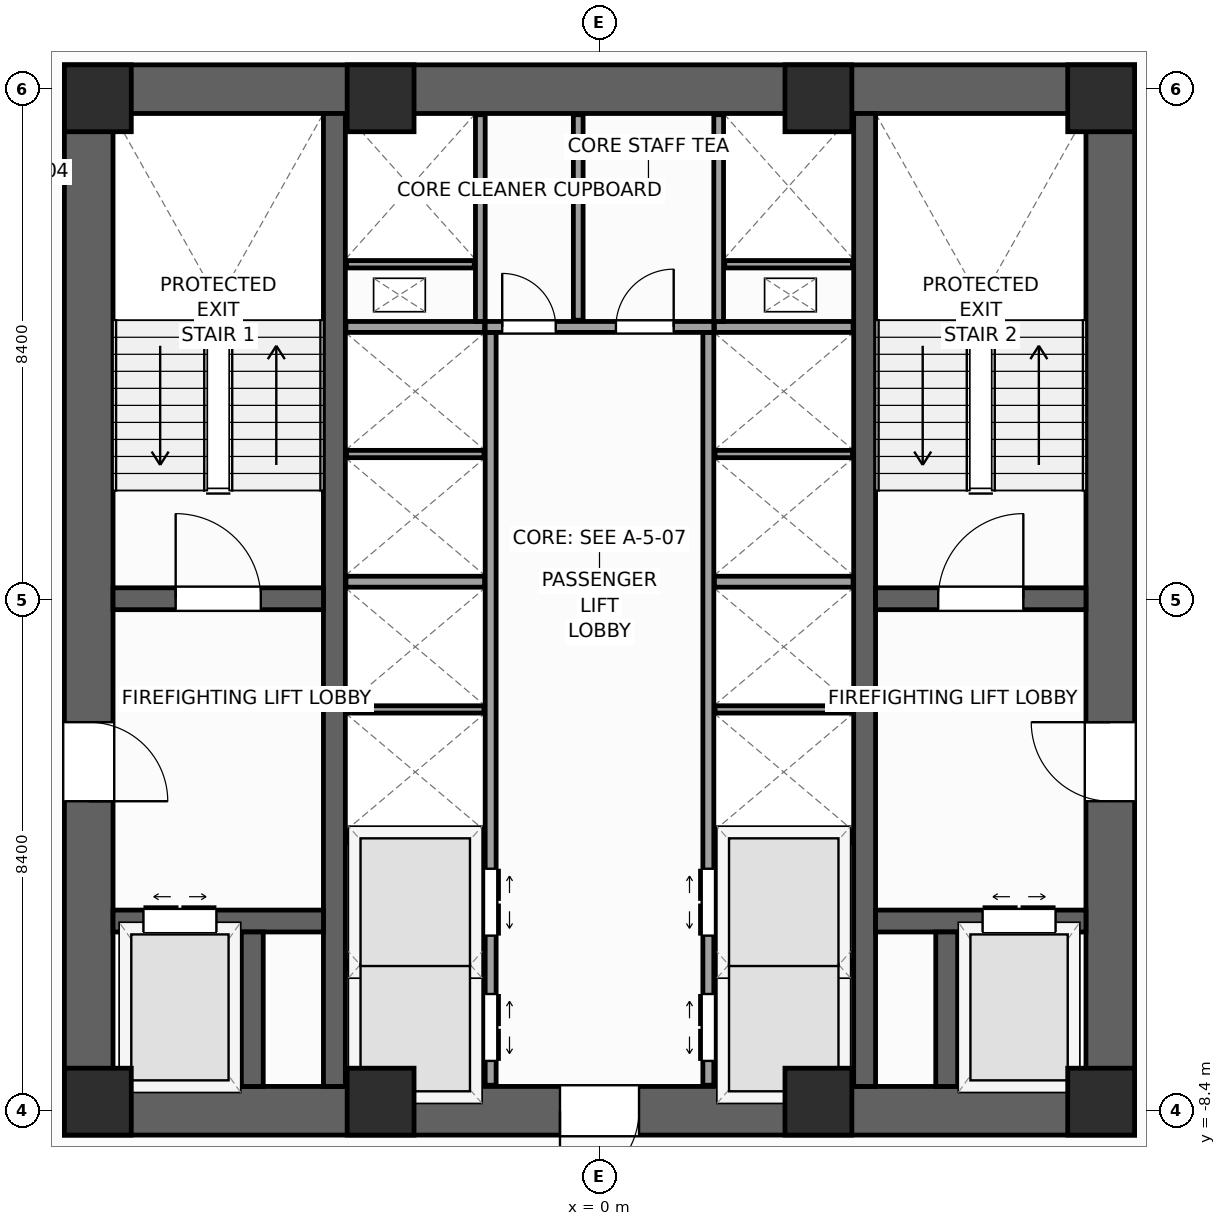
"""IFC4 building model, lengths in metres.
Left out: names, types, materials, properties, quantities, classifications, styles, units other than length and angle.
Written with IfcOpenShell. Run it as: python <this file> out.ifc"""

import sys

from ifc_helpers import new_model, si_unit, direction, frame, frame_2d, origin, origin_2d, place, context, subcontext, project, spatial, rectangle, extrude, source, transform, mapped, element, fill, save


model = new_model("IFC4")
c1 = context("Model", 3, precision=1e-05, world=origin(), true_north=direction((0.0, 1.0)))
c2 = subcontext(c1, "Body", "Model", "MODEL_VIEW")
j1 = project(units=[si_unit("LENGTHUNIT", "METRE"), si_unit("PLANEANGLEUNIT", "RADIAN")], contexts=[c1])
p1 = place(None, origin())
s1 = spatial("IfcSite", under=j1, at=p1, CompositionType="ELEMENT")
p2 = place(p1, origin())
s2 = spatial("IfcBuilding", under=s1, at=p2, CompositionType="ELEMENT")
p3 = place(p2, frame((0.0, 0.0, 38.0)))
s3 = spatial("IfcBuildingStorey", under=s2, at=p3, CompositionType="ELEMENT", Elevation=38.0)
p4 = place(p3, frame((-8.8, -8.4, 0.0), z_axis=(0.0, 0.0, 1.0), x_axis=(1.0, 0.0, 0.0)))
e1 = element("IfcWall", 1, at=p4, inside=s3, PredefinedType="SHEAR", context=c2, shape_type="SweptSolid", body=[
    extrude(rectangle(XDim=17.6, YDim=0.8, at=frame_2d((8.8, 0.0))), origin(), (0.0, 0.0, 1.0), 4.0),
])
p5 = place(p4, frame((8.15, 0.0, 0.0)))
e2 = element("IfcOpeningElement", 2, at=p5, cuts=e1, PredefinedType="OPENING", context=c2, shape_type="SweptSolid", body=[
    extrude(rectangle(XDim=1.3, YDim=2.2, at=frame_2d((0.65, 1.1))), frame((0.0, 0.41, 0.0), z_axis=(0.0, -1.0, 0.0), x_axis=(1.0, 0.0, 0.0)), (0.0, 0.0, 1.0), 0.82),
])
p6 = place(p3, frame((-8.8, 8.4, 0.0), z_axis=(0.0, 0.0, 1.0), x_axis=(1.0, 0.0, 0.0)))
e3 = element("IfcWall", 3, at=p6, inside=s3, PredefinedType="SHEAR", context=c2, shape_type="SweptSolid", body=[
    extrude(rectangle(XDim=17.6, YDim=0.8, at=frame_2d((8.8, 0.0))), origin(), (0.0, 0.0, 1.0), 4.0),
])
p7 = place(p3, frame((-8.4, -8.0, 0.0), z_axis=(0.0, 0.0, 1.0), x_axis=(0.0, 1.0, 0.0)))
e4 = element("IfcWall", 4, at=p7, inside=s3, PredefinedType="SHEAR", context=c2, shape_type="SweptSolid", body=[
    extrude(rectangle(XDim=16.0, YDim=0.8, at=frame_2d((8.0, 0.0))), origin(), (0.0, 0.0, 1.0), 4.0),
])
p8 = place(p7, frame((4.69, 0.0, 0.0)))
e5 = element("IfcOpeningElement", 5, at=p8, cuts=e4, PredefinedType="OPENING", context=c2, shape_type="SweptSolid", body=[
    extrude(rectangle(XDim=1.3, YDim=2.2, at=frame_2d((0.65, 1.1))), frame((0.0, 0.41, 0.0), z_axis=(0.0, -1.0, 0.0), x_axis=(1.0, 0.0, 0.0)), (0.0, 0.0, 1.0), 0.82),
])
p9 = place(p3, frame((8.4, -8.0, 0.0), z_axis=(0.0, 0.0, 1.0), x_axis=(0.0, 1.0, 0.0)))
e6 = element("IfcWall", 6, at=p9, inside=s3, PredefinedType="SHEAR", context=c2, shape_type="SweptSolid", body=[
    extrude(rectangle(XDim=16.0, YDim=0.8, at=frame_2d((8.0, 0.0))), origin(), (0.0, 0.0, 1.0), 4.0),
])
p10 = place(p9, frame((4.69, 0.0, 0.0)))
e7 = element("IfcOpeningElement", 7, at=p10, cuts=e6, PredefinedType="OPENING", context=c2, shape_type="SweptSolid", body=[
    extrude(rectangle(XDim=1.3, YDim=2.2, at=frame_2d((0.65, 1.1))), frame((0.0, 0.41, 0.0), z_axis=(0.0, -1.0, 0.0), x_axis=(1.0, 0.0, 0.0)), (0.0, 0.0, 1.0), 0.82),
])
for number, where, z_axis, x_axis in (
    (8, (-4.36, -8.0, 0.0), (0.0, 0.0, 1.0), (0.0, 1.0, 0.0)),
    (9, (4.36, -8.0, 0.0), (0.0, 0.0, 1.0), (0.0, 1.0, 0.0)),
):
    element("IfcWall", number, at=place(p3, frame(where, z_axis=z_axis, x_axis=x_axis)), inside=s3, PredefinedType="SHEAR", context=c2, shape_type="SweptSolid", body=[
        extrude(rectangle(XDim=16.0, YDim=0.36, at=frame_2d((8.0, 0.0))), origin(), (0.0, 0.0, 1.0), 4.0),
    ])
p11 = place(p3, frame((-8.0, 0.02, 0.0), z_axis=(0.0, 0.0, 1.0), x_axis=(1.0, 0.0, 0.0)))
e10 = element("IfcWall", 10, at=p11, inside=s3, PredefinedType="SHEAR", context=c2, shape_type="SweptSolid", body=[
    extrude(rectangle(XDim=3.46, YDim=0.36, at=frame_2d((1.73, 0.0))), origin(), (0.0, 0.0, 1.0), 4.0),
])
p12 = place(p11, frame((1.03, 0.0, 0.0)))
e11 = element("IfcOpeningElement", 11, at=p12, cuts=e10, PredefinedType="OPENING", context=c2, shape_type="SweptSolid", body=[
    extrude(rectangle(XDim=1.4, YDim=2.2, at=frame_2d((0.7, 1.1))), frame((0.0, 0.19, 0.0), z_axis=(0.0, -1.0, 0.0), x_axis=(1.0, 0.0, 0.0)), (0.0, 0.0, 1.0), 0.38),
])
p13 = place(p3, frame((4.54, 0.02, 0.0), z_axis=(0.0, 0.0, 1.0), x_axis=(1.0, 0.0, 0.0)))
e12 = element("IfcWall", 12, at=p13, inside=s3, PredefinedType="SHEAR", context=c2, shape_type="SweptSolid", body=[
    extrude(rectangle(XDim=3.46, YDim=0.36, at=frame_2d((1.73, 0.0))), origin(), (0.0, 0.0, 1.0), 4.0),
])
p14 = place(p13, frame((1.03, 0.0, 0.0)))
e13 = element("IfcOpeningElement", 13, at=p14, cuts=e12, PredefinedType="OPENING", context=c2, shape_type="SweptSolid", body=[
    extrude(rectangle(XDim=1.4, YDim=2.2, at=frame_2d((0.7, 1.1))), frame((0.0, 0.19, 0.0), z_axis=(0.0, -1.0, 0.0), x_axis=(1.0, 0.0, 0.0)), (0.0, 0.0, 1.0), 0.38),
])
p15 = place(p3, frame((-8.0, -5.28, 0.0), z_axis=(0.0, 0.0, 1.0), x_axis=(1.0, 0.0, 0.0)))
e14 = element("IfcWall", 14, at=p15, inside=s3, PredefinedType="SHEAR", context=c2, shape_type="SweptSolid", body=[
    extrude(rectangle(XDim=3.46, YDim=0.36, at=frame_2d((1.73, 0.0))), origin(), (0.0, 0.0, 1.0), 4.0),
])
p16 = place(p15, frame((0.5, 0.0, 0.0)))
e15 = element("IfcOpeningElement", 15, at=p16, cuts=e14, PredefinedType="OPENING", context=c2, shape_type="SweptSolid", body=[
    extrude(rectangle(XDim=1.2, YDim=2.25, at=frame_2d((0.6, 1.125))), frame((0.0, 0.19, 0.0), z_axis=(0.0, -1.0, 0.0), x_axis=(1.0, 0.0, 0.0)), (0.0, 0.0, 1.0), 0.38),
])
p17 = place(p3, frame((4.54, -5.28, 0.0), z_axis=(0.0, 0.0, 1.0), x_axis=(1.0, 0.0, 0.0)))
e16 = element("IfcWall", 16, at=p17, inside=s3, PredefinedType="SHEAR", context=c2, shape_type="SweptSolid", body=[
    extrude(rectangle(XDim=3.46, YDim=0.36, at=frame_2d((1.73, 0.0))), origin(), (0.0, 0.0, 1.0), 4.0),
])
p18 = place(p17, frame((1.76, 0.0, 0.0)))
e17 = element("IfcOpeningElement", 17, at=p18, cuts=e16, PredefinedType="OPENING", context=c2, shape_type="SweptSolid", body=[
    extrude(rectangle(XDim=1.2, YDim=2.25, at=frame_2d((0.6, 1.125))), frame((0.0, 0.19, 0.0), z_axis=(0.0, -1.0, 0.0), x_axis=(1.0, 0.0, 0.0)), (0.0, 0.0, 1.0), 0.38),
])
for number, where, z_axis, x_axis in (
    (18, (-5.71, -8.0, 0.0), (0.0, 0.0, 1.0), (0.0, 1.0, 0.0)),
    (19, (5.71, -8.0, 0.0), (0.0, 0.0, 1.0), (0.0, 1.0, 0.0)),
):
    element("IfcWall", number, at=place(p3, frame(where, z_axis=z_axis, x_axis=x_axis)), inside=s3, PredefinedType="SHEAR", context=c2, shape_type="SweptSolid", body=[
        extrude(rectangle(XDim=2.54, YDim=0.36, at=frame_2d((1.27, 0.0))), origin(), (0.0, 0.0, 1.0), 4.0),
    ])
m1 = source(origin(), c2, "Body", "SweptSolid", [
    extrude(rectangle(XDim=1.1, YDim=1.1, at=origin_2d()), origin(), (0.0, 0.0, 1.0), 4.0),
])
for number, where, z_axis, x_axis in (
    (20, (-8.25, -8.25, 0.0), (0.0, 0.0, 1.0), (1.0, 0.0, 0.0)),
    (21, (8.25, -8.25, 0.0), (0.0, 0.0, 1.0), (1.0, 0.0, 0.0)),
    (22, (8.25, 8.25, 0.0), (0.0, 0.0, 1.0), (1.0, 0.0, 0.0)),
    (23, (-8.25, 8.25, 0.0), (0.0, 0.0, 1.0), (1.0, 0.0, 0.0)),
    (24, (-3.6, -8.25, 0.0), (0.0, 0.0, 1.0), (1.0, 0.0, 0.0)),
    (25, (3.6, -8.25, 0.0), (0.0, 0.0, 1.0), (1.0, 0.0, 0.0)),
    (26, (-3.6, 8.25, 0.0), (0.0, 0.0, 1.0), (1.0, 0.0, 0.0)),
    (27, (3.6, 8.25, 0.0), (0.0, 0.0, 1.0), (1.0, 0.0, 0.0)),
):
    element("IfcColumn", number, at=place(p3, frame(where, z_axis=z_axis, x_axis=x_axis)), inside=s3, PredefinedType="PILASTER", context=c2, shape_type="MappedRepresentation", body=[
        mapped(m1, transform((0.0, 0.0, 0.0), scale=1.0)),
    ])
p19 = place(p3, frame((-1.79, -7.98, 0.0), z_axis=(0.0, 0.0, 1.0), x_axis=(0.0, 1.0, 0.0)))
e28 = element("IfcWall", 28, at=p19, inside=s3, PredefinedType="PARTITIONING", context=c2, shape_type="SweptSolid", body=[
    extrude(rectangle(XDim=12.38, YDim=0.18, at=frame_2d((6.19, 0.0))), origin(), (0.0, 0.0, 1.0), 3.72),
])
p20 = place(p19, frame((0.4, 0.0, 0.0)))
e29 = element("IfcOpeningElement", 29, at=p20, cuts=e28, PredefinedType="OPENING", context=c2, shape_type="SweptSolid", body=[
    extrude(rectangle(XDim=1.1, YDim=2.2, at=frame_2d((0.55, 1.1))), frame((0.0, 0.1, 0.0), z_axis=(0.0, -1.0, 0.0), x_axis=(1.0, 0.0, 0.0)), (0.0, 0.0, 1.0), 0.2),
])
p21 = place(p19, frame((2.46, 0.0, 0.0)))
e30 = element("IfcOpeningElement", 30, at=p21, cuts=e28, PredefinedType="OPENING", context=c2, shape_type="SweptSolid", body=[
    extrude(rectangle(XDim=1.1, YDim=2.2, at=frame_2d((0.55, 1.1))), frame((0.0, 0.1, 0.0), z_axis=(0.0, -1.0, 0.0), x_axis=(1.0, 0.0, 0.0)), (0.0, 0.0, 1.0), 0.2),
])
p22 = place(p3, frame((1.79, -7.98, 0.0), z_axis=(0.0, 0.0, 1.0), x_axis=(0.0, 1.0, 0.0)))
e31 = element("IfcWall", 31, at=p22, inside=s3, PredefinedType="PARTITIONING", context=c2, shape_type="SweptSolid", body=[
    extrude(rectangle(XDim=12.38, YDim=0.18, at=frame_2d((6.19, 0.0))), origin(), (0.0, 0.0, 1.0), 3.72),
])
p23 = place(p22, frame((0.4, 0.0, 0.0)))
e32 = element("IfcOpeningElement", 32, at=p23, cuts=e31, PredefinedType="OPENING", context=c2, shape_type="SweptSolid", body=[
    extrude(rectangle(XDim=1.1, YDim=2.2, at=frame_2d((0.55, 1.1))), frame((0.0, 0.1, 0.0), z_axis=(0.0, -1.0, 0.0), x_axis=(1.0, 0.0, 0.0)), (0.0, 0.0, 1.0), 0.2),
])
p24 = place(p22, frame((2.46, 0.0, 0.0)))
e33 = element("IfcOpeningElement", 33, at=p24, cuts=e31, PredefinedType="OPENING", context=c2, shape_type="SweptSolid", body=[
    extrude(rectangle(XDim=1.1, YDim=2.2, at=frame_2d((0.55, 1.1))), frame((0.0, 0.1, 0.0), z_axis=(0.0, -1.0, 0.0), x_axis=(1.0, 0.0, 0.0)), (0.0, 0.0, 1.0), 0.2),
])
p25 = place(p3, frame((-1.88, 4.49, 0.0), z_axis=(0.0, 0.0, 1.0), x_axis=(1.0, 0.0, 0.0)))
e34 = element("IfcWall", 34, at=p25, inside=s3, PredefinedType="PARTITIONING", context=c2, shape_type="SweptSolid", body=[
    extrude(rectangle(XDim=3.76, YDim=0.18, at=frame_2d((1.88, 0.0))), origin(), (0.0, 0.0, 1.0), 3.72),
])
p26 = place(p25, frame((0.28, 0.0, 0.0)))
e35 = element("IfcOpeningElement", 35, at=p26, cuts=e34, PredefinedType="OPENING", context=c2, shape_type="SweptSolid", body=[
    extrude(rectangle(XDim=0.88, YDim=2.1, at=frame_2d((0.44, 1.05))), frame((0.0, 0.1, 0.0), z_axis=(0.0, -1.0, 0.0), x_axis=(1.0, 0.0, 0.0)), (0.0, 0.0, 1.0), 0.2),
])
p27 = place(p25, frame((2.15, 0.0, 0.0)))
e36 = element("IfcOpeningElement", 36, at=p27, cuts=e34, PredefinedType="OPENING", context=c2, shape_type="SweptSolid", body=[
    extrude(rectangle(XDim=0.95, YDim=2.1, at=frame_2d((0.475, 1.05))), frame((0.0, 0.1, 0.0), z_axis=(0.0, -1.0, 0.0), x_axis=(1.0, 0.0, 0.0)), (0.0, 0.0, 1.0), 0.2),
])
for number, where, z_axis, x_axis in (
    (37, (-4.17, -3.9, 0.0), (0.0, 0.0, 1.0), (1.0, 0.0, 0.0)),
    (38, (1.89, -3.9, 0.0), (0.0, 0.0, 1.0), (1.0, 0.0, 0.0)),
    (39, (-4.17, 0.3, 0.0), (0.0, 0.0, 1.0), (1.0, 0.0, 0.0)),
    (40, (1.89, 0.3, 0.0), (0.0, 0.0, 1.0), (1.0, 0.0, 0.0)),
    (41, (-4.17, 4.49, 0.0), (0.0, 0.0, 1.0), (1.0, 0.0, 0.0)),
    (42, (1.89, 4.49, 0.0), (0.0, 0.0, 1.0), (1.0, 0.0, 0.0)),
):
    element("IfcWall", number, at=place(p3, frame(where, z_axis=z_axis, x_axis=x_axis)), inside=s3, PredefinedType="PARTITIONING", context=c2, shape_type="SweptSolid", body=[
        extrude(rectangle(XDim=2.28, YDim=0.18, at=frame_2d((1.14, 0.0))), origin(), (0.0, 0.0, 1.0), 3.72),
    ])
for number, where, z_axis, x_axis in (
    (43, (-4.16, -6.0, 0.0), (0.0, 0.0, 1.0), (1.0, 0.0, 0.0)),
    (44, (1.9, -6.0, 0.0), (0.0, 0.0, 1.0), (1.0, 0.0, 0.0)),
    (45, (-4.16, -1.8, 0.0), (0.0, 0.0, 1.0), (1.0, 0.0, 0.0)),
    (46, (1.9, -1.8, 0.0), (0.0, 0.0, 1.0), (1.0, 0.0, 0.0)),
    (47, (-4.16, 2.4, 0.0), (0.0, 0.0, 1.0), (1.0, 0.0, 0.0)),
    (48, (1.9, 2.4, 0.0), (0.0, 0.0, 1.0), (1.0, 0.0, 0.0)),
):
    element("IfcWall", number, at=place(p3, frame(where, z_axis=z_axis, x_axis=x_axis)), inside=s3, PredefinedType="PARTITIONING", context=c2, shape_type="SweptSolid", body=[
        extrude(rectangle(XDim=2.26, YDim=0.12, at=frame_2d((1.13, 0.0))), origin(), (0.0, 0.0, 1.0), 3.72),
    ])
for number, where, z_axis, x_axis in (
    (49, (-1.96, 4.58, 0.0), (0.0, 0.0, 1.0), (0.0, 1.0, 0.0)),
    (50, (1.96, 4.58, 0.0), (0.0, 0.0, 1.0), (0.0, 1.0, 0.0)),
):
    element("IfcWall", number, at=place(p3, frame(where, z_axis=z_axis, x_axis=x_axis)), inside=s3, PredefinedType="PARTITIONING", context=c2, shape_type="SweptSolid", body=[
        extrude(rectangle(XDim=3.4, YDim=0.16, at=frame_2d((1.7, 0.0))), origin(), (0.0, 0.0, 1.0), 3.72),
    ])
for number, where, z_axis, x_axis in (
    (51, (-4.16, 5.52, 0.0), (0.0, 0.0, 1.0), (1.0, 0.0, 0.0)),
    (52, (2.06, 5.52, 0.0), (0.0, 0.0, 1.0), (1.0, 0.0, 0.0)),
):
    element("IfcWall", number, at=place(p3, frame(where, z_axis=z_axis, x_axis=x_axis)), inside=s3, PredefinedType="PARTITIONING", context=c2, shape_type="SweptSolid", body=[
        extrude(rectangle(XDim=2.1, YDim=0.12, at=frame_2d((1.05, 0.0))), origin(), (0.0, 0.0, 1.0), 3.72),
    ])
p28 = place(p3, frame((-0.35, 4.6, 0.0), z_axis=(0.0, 0.0, 1.0), x_axis=(0.0, 1.0, 0.0)))
e53 = element("IfcWall", 53, at=p28, inside=s3, PredefinedType="PARTITIONING", context=c2, shape_type="SweptSolid", body=[
    extrude(rectangle(XDim=3.38, YDim=0.16, at=frame_2d((1.69, 0.0))), origin(), (0.0, 0.0, 1.0), 3.72),
])
m2 = source(origin(), c2, "Body", "SweptSolid", [
    extrude(rectangle(XDim=1.4, YDim=2.2, at=frame_2d((0.7, 1.1))), frame((0.0, 0.025, 0.0), z_axis=(0.0, -1.0, 0.0), x_axis=(1.0, 0.0, 0.0)), (0.0, 0.0, 1.0), 0.05),
])
p29 = place(p12, origin())
e54 = element("IfcDoor", 54, at=p29, inside=s3, OperationType="SINGLE_SWING_LEFT", PredefinedType="DOOR", context=c2, shape_type="MappedRepresentation", body=[
    mapped(m2, transform((0.0, 0.0, 0.0), scale=1.0)),
])
fill(e11, e54)
p30 = place(p14, origin())
e55 = element("IfcDoor", 55, at=p30, inside=s3, OperationType="SINGLE_SWING_RIGHT", PredefinedType="DOOR", context=c2, shape_type="MappedRepresentation", body=[
    mapped(m2, transform((0.0, 0.0, 0.0), scale=1.0)),
])
fill(e13, e55)
m3 = source(origin(), c2, "Body", "SweptSolid", [
    extrude(rectangle(XDim=1.3, YDim=2.2, at=frame_2d((0.65, 1.1))), frame((0.0, 0.025, 0.0), z_axis=(0.0, -1.0, 0.0), x_axis=(1.0, 0.0, 0.0)), (0.0, 0.0, 1.0), 0.05),
])
p31 = place(p8, frame((1.3, 0.0, 0.0), z_axis=(0.0, 0.0, 1.0), x_axis=(-1.0, 0.0, 0.0)))
e56 = element("IfcDoor", 56, at=p31, inside=s3, OperationType="SINGLE_SWING_LEFT", PredefinedType="DOOR", context=c2, shape_type="MappedRepresentation", body=[
    mapped(m3, transform((0.0, 0.0, 0.0), scale=1.0)),
])
fill(e5, e56)
p32 = place(p10, origin())
e57 = element("IfcDoor", 57, at=p32, inside=s3, OperationType="SINGLE_SWING_RIGHT", PredefinedType="DOOR", context=c2, shape_type="MappedRepresentation", body=[
    mapped(m3, transform((0.0, 0.0, 0.0), scale=1.0)),
])
fill(e7, e57)
p33 = place(p5, frame((1.3, 0.0, 0.0), z_axis=(0.0, 0.0, 1.0), x_axis=(-1.0, 0.0, 0.0)))
e58 = element("IfcDoor", 58, at=p33, inside=s3, OperationType="SINGLE_SWING_LEFT", PredefinedType="DOOR", context=c2, shape_type="MappedRepresentation", body=[
    mapped(m3, transform((0.0, 0.0, 0.0), scale=1.0)),
])
fill(e2, e58)
m4 = source(origin(), c2, "Body", "SweptSolid", [
    extrude(rectangle(XDim=1.2, YDim=2.25, at=frame_2d((0.6, 1.125))), frame((0.0, 0.025, 0.0), z_axis=(0.0, -1.0, 0.0), x_axis=(1.0, 0.0, 0.0)), (0.0, 0.0, 1.0), 0.05),
])
p34 = place(p16, origin())
e59 = element("IfcDoor", 59, at=p34, inside=s3, OperationType="DOUBLE_DOOR_SLIDING", PredefinedType="DOOR", context=c2, shape_type="MappedRepresentation", body=[
    mapped(m4, transform((0.0, 0.0, 0.0), scale=1.0)),
])
fill(e15, e59)
p35 = place(p18, origin())
e60 = element("IfcDoor", 60, at=p35, inside=s3, OperationType="DOUBLE_DOOR_SLIDING", PredefinedType="DOOR", context=c2, shape_type="MappedRepresentation", body=[
    mapped(m4, transform((0.0, 0.0, 0.0), scale=1.0)),
])
fill(e17, e60)
m5 = source(origin(), c2, "Body", "SweptSolid", [
    extrude(rectangle(XDim=1.1, YDim=2.2, at=frame_2d((0.55, 1.1))), frame((0.0, 0.025, 0.0), z_axis=(0.0, -1.0, 0.0), x_axis=(1.0, 0.0, 0.0)), (0.0, 0.0, 1.0), 0.05),
])
p36 = place(p20, frame((1.1, 0.0, 0.0), z_axis=(0.0, 0.0, 1.0), x_axis=(-1.0, 0.0, 0.0)))
e61 = element("IfcDoor", 61, at=p36, inside=s3, OperationType="DOUBLE_DOOR_SLIDING", PredefinedType="DOOR", context=c2, shape_type="MappedRepresentation", body=[
    mapped(m5, transform((0.0, 0.0, 0.0), scale=1.0)),
])
fill(e29, e61)
p37 = place(p21, frame((1.1, 0.0, 0.0), z_axis=(0.0, 0.0, 1.0), x_axis=(-1.0, 0.0, 0.0)))
e62 = element("IfcDoor", 62, at=p37, inside=s3, OperationType="DOUBLE_DOOR_SLIDING", PredefinedType="DOOR", context=c2, shape_type="MappedRepresentation", body=[
    mapped(m5, transform((0.0, 0.0, 0.0), scale=1.0)),
])
fill(e30, e62)
p38 = place(p23, origin())
e63 = element("IfcDoor", 63, at=p38, inside=s3, OperationType="DOUBLE_DOOR_SLIDING", PredefinedType="DOOR", context=c2, shape_type="MappedRepresentation", body=[
    mapped(m5, transform((0.0, 0.0, 0.0), scale=1.0)),
])
fill(e32, e63)
p39 = place(p24, origin())
e64 = element("IfcDoor", 64, at=p39, inside=s3, OperationType="DOUBLE_DOOR_SLIDING", PredefinedType="DOOR", context=c2, shape_type="MappedRepresentation", body=[
    mapped(m5, transform((0.0, 0.0, 0.0), scale=1.0)),
])
fill(e33, e64)
m6 = source(origin(), c2, "Body", "SweptSolid", [
    extrude(rectangle(XDim=0.88, YDim=2.1, at=frame_2d((0.44, 1.05))), frame((0.0, 0.025, 0.0), z_axis=(0.0, -1.0, 0.0), x_axis=(1.0, 0.0, 0.0)), (0.0, 0.0, 1.0), 0.05),
])
p40 = place(p26, origin())
e65 = element("IfcDoor", 65, at=p40, inside=s3, OperationType="SINGLE_SWING_LEFT", PredefinedType="DOOR", context=c2, shape_type="MappedRepresentation", body=[
    mapped(m6, transform((0.0, 0.0, 0.0), scale=1.0)),
])
fill(e35, e65)
m7 = source(origin(), c2, "Body", "SweptSolid", [
    extrude(rectangle(XDim=0.95, YDim=2.1, at=frame_2d((0.475, 1.05))), frame((0.0, 0.025, 0.0), z_axis=(0.0, -1.0, 0.0), x_axis=(1.0, 0.0, 0.0)), (0.0, 0.0, 1.0), 0.05),
])
p41 = place(p27, origin())
e66 = element("IfcDoor", 66, at=p41, inside=s3, OperationType="SINGLE_SWING_RIGHT", PredefinedType="DOOR", context=c2, shape_type="MappedRepresentation", body=[
    mapped(m7, transform((0.0, 0.0, 0.0), scale=1.0)),
])
fill(e36, e66)
save(model, sys.argv[1])
